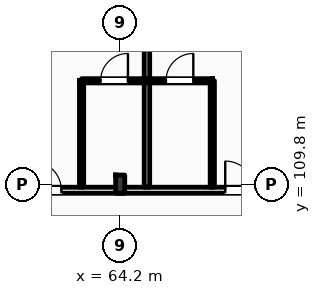
"""IFC4 building model, lengths in metres.
Left out: names, types, materials, properties, quantities, classifications, styles, units other than length and angle.
Written with IfcOpenShell. Run it as: python <this file> out.ifc"""

import sys

from ifc_helpers import new_model, si_unit, direction, frame, frame_2d, origin, origin_2d, place, context, subcontext, project, spatial, rectangle, i_section, extrude, element, fill, save


model = new_model("IFC4")
c1 = context("Model", 3, precision=1e-05, world=origin(), true_north=direction((0.0, 1.0)))
c2 = subcontext(c1, "Body", "Model", "MODEL_VIEW")
j1 = project(units=[si_unit("LENGTHUNIT", "METRE"), si_unit("PLANEANGLEUNIT", "RADIAN")], contexts=[c1])
p1 = place(None, origin())
s1 = spatial("IfcSite", under=j1, at=p1, CompositionType="ELEMENT")
p2 = place(p1, origin())
s2 = spatial("IfcBuilding", under=s1, at=p2, CompositionType="ELEMENT")
p3 = place(p2, frame((0.0, 0.0, 20.4)))
s3 = spatial("IfcBuildingStorey", under=s2, at=p3, CompositionType="ELEMENT", Elevation=20.4)
p4 = place(p3, frame((64.2, 109.8, 0.0), z_axis=(0.0, 0.0, 1.0), x_axis=(1.0, 0.0, 0.0)))
e1 = element("IfcColumn", 1, at=p4, inside=s3, PredefinedType="COLUMN", context=c2, shape_type="SweptSolid", body=[
    extrude(i_section(OverallWidth=0.3, OverallDepth=0.6, WebThickness=0.015, FlangeThickness=0.03, FilletRadius=0.027, at=origin_2d()), origin(), (0.0, 0.0, 1.0), 4.2),
])
p5 = place(p3, frame((10.65, 109.6, 0.0), z_axis=(0.0, 0.0, 1.0), x_axis=(1.0, 0.0, 0.0)))
e2 = element("IfcWall", 2, at=p5, inside=s3, PredefinedType="PARTITIONING", context=c2, shape_type="SweptSolid", body=[
    extrude(rectangle(XDim=109.21, YDim=0.2, at=frame_2d((54.605, 0.0))), origin(), (0.0, 0.0, 1.0), 3.38),
])
p6 = place(p5, frame((12.535, 0.0, 0.0)))
e3 = element("IfcOpeningElement", 3, at=p6, cuts=e2, PredefinedType="OPENING", context=c2, shape_type="SweptSolid", body=[
    extrude(rectangle(XDim=1.02, YDim=2.2, at=frame_2d((0.51, 1.1))), frame((0.0, 0.11, 0.0), z_axis=(0.0, -1.0, 0.0), x_axis=(1.0, 0.0, 0.0)), (0.0, 0.0, 1.0), 0.22),
])
p7 = place(p5, frame((19.175, 0.0, 0.0)))
e4 = element("IfcOpeningElement", 4, at=p7, cuts=e2, PredefinedType="OPENING", context=c2, shape_type="SweptSolid", body=[
    extrude(rectangle(XDim=1.02, YDim=2.2, at=frame_2d((0.51, 1.1))), frame((0.0, 0.11, 0.0), z_axis=(0.0, -1.0, 0.0), x_axis=(1.0, 0.0, 0.0)), (0.0, 0.0, 1.0), 0.22),
])
p8 = place(p5, frame((23.375, 0.0, 0.0)))
e5 = element("IfcOpeningElement", 5, at=p8, cuts=e2, PredefinedType="OPENING", context=c2, shape_type="SweptSolid", body=[
    extrude(rectangle(XDim=1.02, YDim=2.2, at=frame_2d((0.51, 1.1))), frame((0.0, 0.11, 0.0), z_axis=(0.0, -1.0, 0.0), x_axis=(1.0, 0.0, 0.0)), (0.0, 0.0, 1.0), 0.22),
])
p9 = place(p5, frame((27.575, 0.0, 0.0)))
e6 = element("IfcOpeningElement", 6, at=p9, cuts=e2, PredefinedType="OPENING", context=c2, shape_type="SweptSolid", body=[
    extrude(rectangle(XDim=1.02, YDim=2.2, at=frame_2d((0.51, 1.1))), frame((0.0, 0.11, 0.0), z_axis=(0.0, -1.0, 0.0), x_axis=(1.0, 0.0, 0.0)), (0.0, 0.0, 1.0), 0.22),
])
p10 = place(p5, frame((31.805, 0.0, 0.0)))
e7 = element("IfcOpeningElement", 7, at=p10, cuts=e2, PredefinedType="OPENING", context=c2, shape_type="SweptSolid", body=[
    extrude(rectangle(XDim=0.96, YDim=2.2, at=frame_2d((0.48, 1.1))), frame((0.0, 0.11, 0.0), z_axis=(0.0, -1.0, 0.0), x_axis=(1.0, 0.0, 0.0)), (0.0, 0.0, 1.0), 0.22),
])
p11 = place(p5, frame((33.855, 0.0, 0.0)))
e8 = element("IfcOpeningElement", 8, at=p11, cuts=e2, PredefinedType="OPENING", context=c2, shape_type="SweptSolid", body=[
    extrude(rectangle(XDim=0.96, YDim=2.2, at=frame_2d((0.48, 1.1))), frame((0.0, 0.11, 0.0), z_axis=(0.0, -1.0, 0.0), x_axis=(1.0, 0.0, 0.0)), (0.0, 0.0, 1.0), 0.22),
])
p12 = place(p5, frame((40.205, 0.0, 0.0)))
e9 = element("IfcOpeningElement", 9, at=p12, cuts=e2, PredefinedType="OPENING", context=c2, shape_type="SweptSolid", body=[
    extrude(rectangle(XDim=0.96, YDim=2.2, at=frame_2d((0.48, 1.1))), frame((0.0, 0.11, 0.0), z_axis=(0.0, -1.0, 0.0), x_axis=(1.0, 0.0, 0.0)), (0.0, 0.0, 1.0), 0.22),
])
p13 = place(p5, frame((42.255, 0.0, 0.0)))
e10 = element("IfcOpeningElement", 10, at=p13, cuts=e2, PredefinedType="OPENING", context=c2, shape_type="SweptSolid", body=[
    extrude(rectangle(XDim=0.96, YDim=2.2, at=frame_2d((0.48, 1.1))), frame((0.0, 0.11, 0.0), z_axis=(0.0, -1.0, 0.0), x_axis=(1.0, 0.0, 0.0)), (0.0, 0.0, 1.0), 0.22),
])
p14 = place(p5, frame((48.605, 0.0, 0.0)))
e11 = element("IfcOpeningElement", 11, at=p14, cuts=e2, PredefinedType="OPENING", context=c2, shape_type="SweptSolid", body=[
    extrude(rectangle(XDim=0.96, YDim=2.2, at=frame_2d((0.48, 1.1))), frame((0.0, 0.11, 0.0), z_axis=(0.0, -1.0, 0.0), x_axis=(1.0, 0.0, 0.0)), (0.0, 0.0, 1.0), 0.22),
])
p15 = place(p5, frame((50.655, 0.0, 0.0)))
e12 = element("IfcOpeningElement", 12, at=p15, cuts=e2, PredefinedType="OPENING", context=c2, shape_type="SweptSolid", body=[
    extrude(rectangle(XDim=0.96, YDim=2.2, at=frame_2d((0.48, 1.1))), frame((0.0, 0.11, 0.0), z_axis=(0.0, -1.0, 0.0), x_axis=(1.0, 0.0, 0.0)), (0.0, 0.0, 1.0), 0.22),
])
p16 = place(p5, frame((57.005, 0.0, 0.0)))
e13 = element("IfcOpeningElement", 13, at=p16, cuts=e2, PredefinedType="OPENING", context=c2, shape_type="SweptSolid", body=[
    extrude(rectangle(XDim=0.96, YDim=2.2, at=frame_2d((0.48, 1.1))), frame((0.0, 0.11, 0.0), z_axis=(0.0, -1.0, 0.0), x_axis=(1.0, 0.0, 0.0)), (0.0, 0.0, 1.0), 0.22),
])
p17 = place(p5, frame((59.055, 0.0, 0.0)))
e14 = element("IfcOpeningElement", 14, at=p17, cuts=e2, PredefinedType="OPENING", context=c2, shape_type="SweptSolid", body=[
    extrude(rectangle(XDim=0.96, YDim=2.2, at=frame_2d((0.48, 1.1))), frame((0.0, 0.11, 0.0), z_axis=(0.0, -1.0, 0.0), x_axis=(1.0, 0.0, 0.0)), (0.0, 0.0, 1.0), 0.22),
])
p18 = place(p5, frame((65.405, 0.0, 0.0)))
e15 = element("IfcOpeningElement", 15, at=p18, cuts=e2, PredefinedType="OPENING", context=c2, shape_type="SweptSolid", body=[
    extrude(rectangle(XDim=0.96, YDim=2.2, at=frame_2d((0.48, 1.1))), frame((0.0, 0.11, 0.0), z_axis=(0.0, -1.0, 0.0), x_axis=(1.0, 0.0, 0.0)), (0.0, 0.0, 1.0), 0.22),
])
p19 = place(p5, frame((67.205, 0.0, 0.0)))
e16 = element("IfcOpeningElement", 16, at=p19, cuts=e2, PredefinedType="OPENING", context=c2, shape_type="SweptSolid", body=[
    extrude(rectangle(XDim=0.96, YDim=2.2, at=frame_2d((0.48, 1.1))), frame((0.0, 0.11, 0.0), z_axis=(0.0, -1.0, 0.0), x_axis=(1.0, 0.0, 0.0)), (0.0, 0.0, 1.0), 0.22),
])
p20 = place(p5, frame((73.805, 0.0, 0.0)))
e17 = element("IfcOpeningElement", 17, at=p20, cuts=e2, PredefinedType="OPENING", context=c2, shape_type="SweptSolid", body=[
    extrude(rectangle(XDim=0.96, YDim=2.2, at=frame_2d((0.48, 1.1))), frame((0.0, 0.11, 0.0), z_axis=(0.0, -1.0, 0.0), x_axis=(1.0, 0.0, 0.0)), (0.0, 0.0, 1.0), 0.22),
])
p21 = place(p5, frame((78.255, 0.0, 0.0)))
e18 = element("IfcOpeningElement", 18, at=p21, cuts=e2, PredefinedType="OPENING", context=c2, shape_type="SweptSolid", body=[
    extrude(rectangle(XDim=0.96, YDim=2.2, at=frame_2d((0.48, 1.1))), frame((0.0, 0.11, 0.0), z_axis=(0.0, -1.0, 0.0), x_axis=(1.0, 0.0, 0.0)), (0.0, 0.0, 1.0), 0.22),
])
p22 = place(p5, frame((82.205, 0.0, 0.0)))
e19 = element("IfcOpeningElement", 19, at=p22, cuts=e2, PredefinedType="OPENING", context=c2, shape_type="SweptSolid", body=[
    extrude(rectangle(XDim=0.96, YDim=2.2, at=frame_2d((0.48, 1.1))), frame((0.0, 0.11, 0.0), z_axis=(0.0, -1.0, 0.0), x_axis=(1.0, 0.0, 0.0)), (0.0, 0.0, 1.0), 0.22),
])
p23 = place(p5, frame((86.405, 0.0, 0.0)))
e20 = element("IfcOpeningElement", 20, at=p23, cuts=e2, PredefinedType="OPENING", context=c2, shape_type="SweptSolid", body=[
    extrude(rectangle(XDim=0.96, YDim=2.2, at=frame_2d((0.48, 1.1))), frame((0.0, 0.11, 0.0), z_axis=(0.0, -1.0, 0.0), x_axis=(1.0, 0.0, 0.0)), (0.0, 0.0, 1.0), 0.22),
])
p24 = place(p5, frame((90.605, 0.0, 0.0)))
e21 = element("IfcOpeningElement", 21, at=p24, cuts=e2, PredefinedType="OPENING", context=c2, shape_type="SweptSolid", body=[
    extrude(rectangle(XDim=0.96, YDim=2.2, at=frame_2d((0.48, 1.1))), frame((0.0, 0.11, 0.0), z_axis=(0.0, -1.0, 0.0), x_axis=(1.0, 0.0, 0.0)), (0.0, 0.0, 1.0), 0.22),
])
p25 = place(p5, frame((94.805, 0.0, 0.0)))
e22 = element("IfcOpeningElement", 22, at=p25, cuts=e2, PredefinedType="OPENING", context=c2, shape_type="SweptSolid", body=[
    extrude(rectangle(XDim=0.96, YDim=2.2, at=frame_2d((0.48, 1.1))), frame((0.0, 0.11, 0.0), z_axis=(0.0, -1.0, 0.0), x_axis=(1.0, 0.0, 0.0)), (0.0, 0.0, 1.0), 0.22),
])
p26 = place(p5, frame((99.005, 0.0, 0.0)))
e23 = element("IfcOpeningElement", 23, at=p26, cuts=e2, PredefinedType="OPENING", context=c2, shape_type="SweptSolid", body=[
    extrude(rectangle(XDim=0.96, YDim=2.2, at=frame_2d((0.48, 1.1))), frame((0.0, 0.11, 0.0), z_axis=(0.0, -1.0, 0.0), x_axis=(1.0, 0.0, 0.0)), (0.0, 0.0, 1.0), 0.22),
])
p27 = place(p5, frame((103.205, 0.0, 0.0)))
e24 = element("IfcOpeningElement", 24, at=p27, cuts=e2, PredefinedType="OPENING", context=c2, shape_type="SweptSolid", body=[
    extrude(rectangle(XDim=0.96, YDim=2.2, at=frame_2d((0.48, 1.1))), frame((0.0, 0.11, 0.0), z_axis=(0.0, -1.0, 0.0), x_axis=(1.0, 0.0, 0.0)), (0.0, 0.0, 1.0), 0.22),
])
p28 = place(p5, frame((105.335, 0.0, 0.0)))
e25 = element("IfcOpeningElement", 25, at=p28, cuts=e2, PredefinedType="OPENING", context=c2, shape_type="SweptSolid", body=[
    extrude(rectangle(XDim=0.96, YDim=2.2, at=frame_2d((0.48, 1.1))), frame((0.0, 0.11, 0.0), z_axis=(0.0, -1.0, 0.0), x_axis=(1.0, 0.0, 0.0)), (0.0, 0.0, 1.0), 0.22),
])
p29 = place(p5, frame((2.716, 0.0, 0.0)))
e26 = element("IfcOpeningElement", 26, at=p29, cuts=e2, PredefinedType="OPENING", context=c2, shape_type="SweptSolid", body=[
    extrude(rectangle(XDim=1.35, YDim=2.25, at=frame_2d((0.675, 1.125))), frame((0.0, 0.11, 0.0), z_axis=(0.0, -1.0, 0.0), x_axis=(1.0, 0.0, 0.0)), (0.0, 0.0, 1.0), 0.22),
])
p30 = place(p5, frame((6.65, 0.0, 0.0)))
e27 = element("IfcOpeningElement", 27, at=p30, cuts=e2, PredefinedType="OPENING", context=c2, shape_type="SweptSolid", body=[
    extrude(rectangle(XDim=1.35, YDim=2.25, at=frame_2d((0.675, 1.125))), frame((0.0, 0.11, 0.0), z_axis=(0.0, -1.0, 0.0), x_axis=(1.0, 0.0, 0.0)), (0.0, 0.0, 1.0), 0.22),
])
p31 = place(p5, frame((10.583, 0.0, 0.0)))
e28 = element("IfcOpeningElement", 28, at=p31, cuts=e2, PredefinedType="OPENING", context=c2, shape_type="SweptSolid", body=[
    extrude(rectangle(XDim=1.35, YDim=2.25, at=frame_2d((0.675, 1.125))), frame((0.0, 0.11, 0.0), z_axis=(0.0, -1.0, 0.0), x_axis=(1.0, 0.0, 0.0)), (0.0, 0.0, 1.0), 0.22),
])
p32 = place(p3, frame((65.08, 109.7, 0.0), z_axis=(0.0, 0.0, 1.0), x_axis=(0.0, 1.0, 0.0)))
e29 = element("IfcWall", 29, at=p32, inside=s3, PredefinedType="PARTITIONING", context=c2, shape_type="SweptSolid", body=[
    extrude(rectangle(XDim=8.15, YDim=0.18, at=frame_2d((4.075, 0.0))), origin(), (0.0, 0.0, 1.0), 3.94),
])
p33 = place(p3, frame((62.93, 109.7, 0.0), z_axis=(0.0, 0.0, 1.0), x_axis=(0.0, 1.0, 0.0)))
e30 = element("IfcWall", 30, at=p33, inside=s3, PredefinedType="PARTITIONING", context=c2, shape_type="SweptSolid", body=[
    extrude(rectangle(XDim=3.5, YDim=0.14, at=frame_2d((1.75, 0.0))), origin(), (0.0, 0.0, 1.0), 3.94),
])
p34 = place(p3, frame((62.93, 113.2, 0.0), z_axis=(0.0, 0.0, 1.0), x_axis=(1.0, 0.0, 0.0)))
e31 = element("IfcWall", 31, at=p34, inside=s3, PredefinedType="PARTITIONING", context=c2, shape_type="SweptSolid", body=[
    extrude(rectangle(XDim=2.15, YDim=0.14, at=frame_2d((1.075, 0.0))), origin(), (0.0, 0.0, 1.0), 3.94),
])
p35 = place(p34, frame((0.625, 0.0, 0.0)))
e32 = element("IfcOpeningElement", 32, at=p35, cuts=e31, PredefinedType="OPENING", context=c2, shape_type="SweptSolid", body=[
    extrude(rectangle(XDim=0.9, YDim=2.1, at=frame_2d((0.45, 1.05))), frame((0.0, 0.08, 0.0), z_axis=(0.0, -1.0, 0.0), x_axis=(1.0, 0.0, 0.0)), (0.0, 0.0, 1.0), 0.16),
])
p36 = place(p3, frame((67.23, 109.7, 0.0), z_axis=(0.0, 0.0, 1.0), x_axis=(0.0, 1.0, 0.0)))
e33 = element("IfcWall", 33, at=p36, inside=s3, PredefinedType="PARTITIONING", context=c2, shape_type="SweptSolid", body=[
    extrude(rectangle(XDim=3.5, YDim=0.14, at=frame_2d((1.75, 0.0))), origin(), (0.0, 0.0, 1.0), 3.94),
])
p37 = place(p3, frame((65.08, 113.2, 0.0), z_axis=(0.0, 0.0, 1.0), x_axis=(1.0, 0.0, 0.0)))
e34 = element("IfcWall", 34, at=p37, inside=s3, PredefinedType="PARTITIONING", context=c2, shape_type="SweptSolid", body=[
    extrude(rectangle(XDim=2.15, YDim=0.14, at=frame_2d((1.075, 0.0))), origin(), (0.0, 0.0, 1.0), 3.94),
])
p38 = place(p37, frame((0.625, 0.0, 0.0)))
e35 = element("IfcOpeningElement", 35, at=p38, cuts=e34, PredefinedType="OPENING", context=c2, shape_type="SweptSolid", body=[
    extrude(rectangle(XDim=0.9, YDim=2.1, at=frame_2d((0.45, 1.05))), frame((0.0, 0.08, 0.0), z_axis=(0.0, -1.0, 0.0), x_axis=(1.0, 0.0, 0.0)), (0.0, 0.0, 1.0), 0.16),
])
p39 = place(p15, origin())
e36 = element("IfcDoor", 36, at=p39, inside=s3, OperationType="SINGLE_SWING_LEFT", PredefinedType="DOOR", context=c2, shape_type="SweptSolid", body=[
    extrude(rectangle(XDim=0.96, YDim=2.2, at=frame_2d((0.48, 1.1))), frame((0.0, 0.025, 0.0), z_axis=(0.0, -1.0, 0.0), x_axis=(1.0, 0.0, 0.0)), (0.0, 0.0, 1.0), 0.05),
])
fill(e12, e36)
p40 = place(p35, origin())
e37 = element("IfcDoor", 37, at=p40, inside=s3, OperationType="SINGLE_SWING_RIGHT", PredefinedType="DOOR", context=c2, shape_type="SweptSolid", body=[
    extrude(rectangle(XDim=0.9, YDim=2.1, at=frame_2d((0.45, 1.05))), frame((0.0, 0.025, 0.0), z_axis=(0.0, -1.0, 0.0), x_axis=(1.0, 0.0, 0.0)), (0.0, 0.0, 1.0), 0.05),
])
fill(e32, e37)
p41 = place(p16, origin())
e38 = element("IfcDoor", 38, at=p41, inside=s3, OperationType="SINGLE_SWING_LEFT", PredefinedType="DOOR", context=c2, shape_type="SweptSolid", body=[
    extrude(rectangle(XDim=0.96, YDim=2.2, at=frame_2d((0.48, 1.1))), frame((0.0, 0.025, 0.0), z_axis=(0.0, -1.0, 0.0), x_axis=(1.0, 0.0, 0.0)), (0.0, 0.0, 1.0), 0.05),
])
fill(e13, e38)
p42 = place(p38, origin())
e39 = element("IfcDoor", 39, at=p42, inside=s3, OperationType="SINGLE_SWING_RIGHT", PredefinedType="DOOR", context=c2, shape_type="SweptSolid", body=[
    extrude(rectangle(XDim=0.9, YDim=2.1, at=frame_2d((0.45, 1.05))), frame((0.0, 0.025, 0.0), z_axis=(0.0, -1.0, 0.0), x_axis=(1.0, 0.0, 0.0)), (0.0, 0.0, 1.0), 0.05),
])
fill(e35, e39)
save(model, sys.argv[1])
